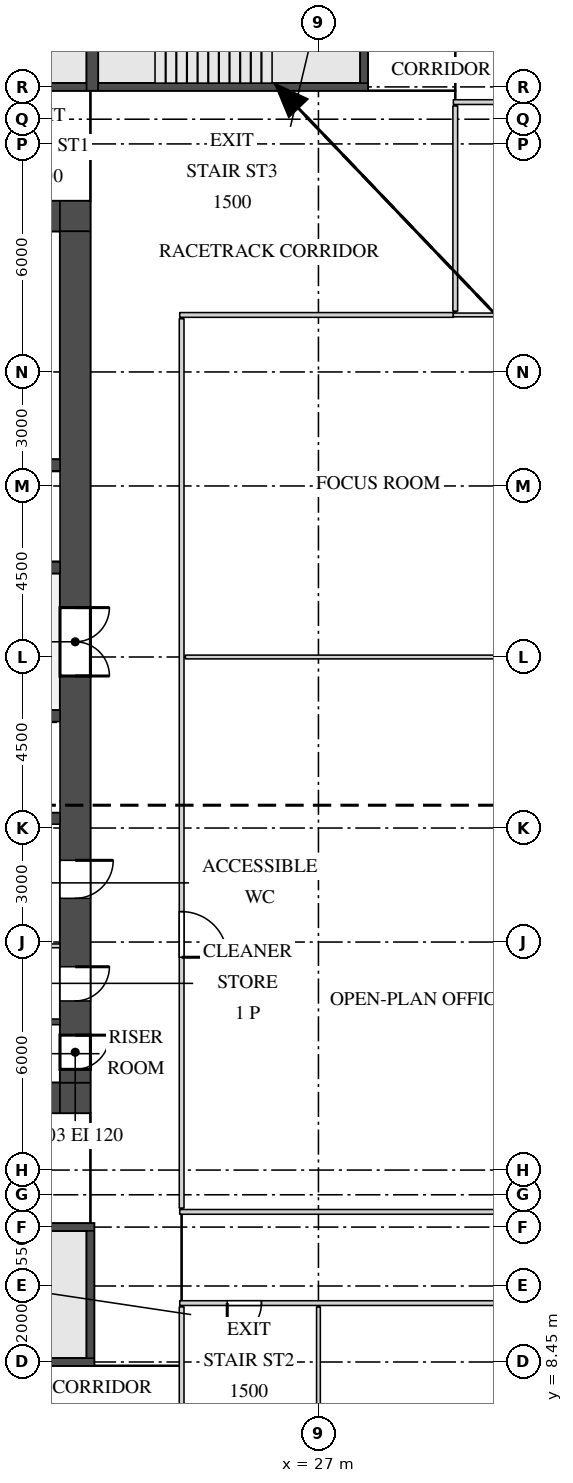
"""IFC4 building model, lengths in metres.
Left out: names, types, materials, properties, quantities, classifications, styles, units other than length and angle.
Written with IfcOpenShell. Run it as: python <this file> out.ifc"""

import sys

from ifc_helpers import new_model, si_unit, direction, frame, frame_2d, origin, place, context, subcontext, project, spatial, rectangle, extrude, source, transform, mapped, element, fill, save


model = new_model("IFC4")
c1 = context("Model", 3, precision=1e-05, world=origin(), true_north=direction((0.0, 1.0)))
c2 = subcontext(c1, "Body", "Model", "MODEL_VIEW")
j1 = project(units=[si_unit("LENGTHUNIT", "METRE"), si_unit("PLANEANGLEUNIT", "RADIAN")], contexts=[c1])
p1 = place(None, origin())
s1 = spatial("IfcSite", under=j1, at=p1, CompositionType="ELEMENT")
p2 = place(p1, origin())
s2 = spatial("IfcBuilding", under=s1, at=p2, CompositionType="ELEMENT")
p3 = place(p2, frame((0.0, 0.0, 188.7)))
s3 = spatial("IfcBuildingStorey", under=s2, at=p3, CompositionType="ELEMENT", Elevation=188.7)
m1 = source(origin(), c2, "Body", "SweptSolid", [
    extrude(rectangle(XDim=13.4, YDim=0.8, at=frame_2d((6.7, 0.0))), origin(), (0.0, 0.0, 1.0), 3.75),
])
p4 = place(p3, frame((6.8, 38.6, 0.0), z_axis=(0.0, 0.0, 1.0), x_axis=(1.0, 0.0, 0.0)))
e1 = element("IfcWall", 1, at=p4, inside=s3, PredefinedType="SHEAR", context=c2, shape_type="MappedRepresentation", body=[
    mapped(m1, transform((0.0, 0.0, 0.0))),
])
m2 = source(origin(), c2, "Body", "SweptSolid", [
    extrude(rectangle(XDim=0.9, YDim=2.1, at=frame_2d((0.45, 1.05))), frame((0.0, 0.41, 0.0), z_axis=(0.0, -1.0, 0.0), x_axis=(1.0, 0.0, 0.0)), (0.0, 0.0, 1.0), 0.82),
])
p5 = place(p4, frame((1.75, 0.0, 0.0)))
e2 = element("IfcOpeningElement", 2, at=p5, cuts=e1, PredefinedType="OPENING", context=c2, shape_type="MappedRepresentation", body=[
    mapped(m2, transform((0.0, 0.0, 0.0))),
])
p6 = place(p4, frame((8.45, 0.0, 0.0)))
e3 = element("IfcOpeningElement", 3, at=p6, cuts=e1, PredefinedType="OPENING", context=c2, shape_type="MappedRepresentation", body=[
    mapped(m2, transform((0.0, 0.0, 0.0))),
])
m3 = source(origin(), c2, "Body", "SweptSolid", [
    extrude(rectangle(XDim=0.8, YDim=0.8, at=frame_2d((0.4, 0.0))), origin(), (0.0, 0.0, 1.0), 3.75),
])
p7 = place(p3, frame((20.2, 38.6, 0.0), z_axis=(0.0, 0.0, 1.0), x_axis=(1.0, 0.0, 0.0)))
e4 = element("IfcWall", 4, at=p7, inside=s3, PredefinedType="SHEAR", context=c2, shape_type="MappedRepresentation", body=[
    mapped(m3, transform((0.0, 0.0, 0.0))),
])
p8 = place(p3, frame((6.8, 15.4, 0.0), z_axis=(0.0, 0.0, 1.0), x_axis=(1.0, 0.0, 0.0)))
e5 = element("IfcWall", 5, at=p8, inside=s3, PredefinedType="SHEAR", context=c2, shape_type="MappedRepresentation", body=[
    mapped(m1, transform((0.0, 0.0, 0.0))),
])
m4 = source(origin(), c2, "Body", "SweptSolid", [
    extrude(rectangle(XDim=1.2, YDim=2.1, at=frame_2d((0.6, 1.05))), frame((0.0, 0.41, 0.0), z_axis=(0.0, -1.0, 0.0), x_axis=(1.0, 0.0, 0.0)), (0.0, 0.0, 1.0), 0.82),
])
p9 = place(p8, frame((5.4, 0.0, 0.0)))
e6 = element("IfcOpeningElement", 6, at=p9, cuts=e5, PredefinedType="OPENING", context=c2, shape_type="MappedRepresentation", body=[
    mapped(m4, transform((0.0, 0.0, 0.0))),
])
p10 = place(p8, frame((2.05, 0.0, 0.0)))
e7 = element("IfcOpeningElement", 7, at=p10, cuts=e5, PredefinedType="OPENING", context=c2, shape_type="MappedRepresentation", body=[
    mapped(m4, transform((0.0, 0.0, 0.0))),
])
m5 = source(origin(), c2, "Body", "SweptSolid", [
    extrude(rectangle(XDim=1.0, YDim=2.1, at=frame_2d((0.5, 1.05))), frame((0.0, 0.41, 0.0), z_axis=(0.0, -1.0, 0.0), x_axis=(1.0, 0.0, 0.0)), (0.0, 0.0, 1.0), 0.82),
])
p11 = place(p8, frame((7.9, 0.0, 0.0)))
e8 = element("IfcOpeningElement", 8, at=p11, cuts=e5, PredefinedType="OPENING", context=c2, shape_type="MappedRepresentation", body=[
    mapped(m5, transform((0.0, 0.0, 0.0))),
])
p12 = place(p3, frame((20.2, 15.4, 0.0), z_axis=(0.0, 0.0, 1.0), x_axis=(1.0, 0.0, 0.0)))
e9 = element("IfcWall", 9, at=p12, inside=s3, PredefinedType="SHEAR", context=c2, shape_type="MappedRepresentation", body=[
    mapped(m3, transform((0.0, 0.0, 0.0))),
])
m6 = source(origin(), c2, "Body", "SweptSolid", [
    extrude(rectangle(XDim=22.4, YDim=0.8, at=frame_2d((11.2, 0.0))), origin(), (0.0, 0.0, 1.0), 3.75),
])
p13 = place(p3, frame((20.6, 15.8, 0.0), z_axis=(0.0, 0.0, 1.0), x_axis=(0.0, 1.0, 0.0)))
e10 = element("IfcWall", 10, at=p13, inside=s3, PredefinedType="SHEAR", context=c2, shape_type="MappedRepresentation", body=[
    mapped(m6, transform((0.0, 0.0, 0.0))),
])
m7 = source(origin(), c2, "Body", "SweptSolid", [
    extrude(rectangle(XDim=1.8, YDim=2.1, at=frame_2d((0.9, 1.05))), frame((0.0, 0.41, 0.0), z_axis=(0.0, -1.0, 0.0), x_axis=(1.0, 0.0, 0.0)), (0.0, 0.0, 1.0), 0.82),
])
p14 = place(p13, frame((10.7, 0.0, 0.0)))
e11 = element("IfcOpeningElement", 11, at=p14, cuts=e10, PredefinedType="OPENING", context=c2, shape_type="MappedRepresentation", body=[
    mapped(m7, transform((0.0, 0.0, 0.0))),
])
p15 = place(p13, frame((0.35, 0.0, 0.0)))
e12 = element("IfcOpeningElement", 12, at=p15, cuts=e10, PredefinedType="OPENING", context=c2, shape_type="MappedRepresentation", body=[
    mapped(m2, transform((0.0, 0.0, 0.0))),
])
p16 = place(p13, frame((2.15, 0.0, 0.0)))
e13 = element("IfcOpeningElement", 13, at=p16, cuts=e10, PredefinedType="OPENING", context=c2, shape_type="MappedRepresentation", body=[
    mapped(m2, transform((0.0, 0.0, 0.0))),
])
p17 = place(p13, frame((4.85, 0.0, 0.0)))
e14 = element("IfcOpeningElement", 14, at=p17, cuts=e10, PredefinedType="OPENING", context=c2, shape_type="MappedRepresentation", body=[
    mapped(m5, transform((0.0, 0.0, 0.0))),
])
m8 = source(origin(), c2, "Body", "SweptSolid", [
    extrude(rectangle(XDim=7.0, YDim=0.2, at=frame_2d((3.5, 0.0))), origin(), (0.0, 0.0, 1.0), 3.75),
])
p18 = place(p3, frame((13.9, 42.0, 0.0), z_axis=(0.0, 0.0, 1.0), x_axis=(1.0, 0.0, 0.0)))
e15 = element("IfcWall", 15, at=p18, inside=s3, PredefinedType="SHEAR", context=c2, shape_type="MappedRepresentation", body=[
    mapped(m8, transform((0.0, 0.0, 0.0))),
])
m9 = source(origin(), c2, "Body", "SweptSolid", [
    extrude(rectangle(XDim=7.2, YDim=0.2, at=frame_2d((3.6, 0.0))), origin(), (0.0, 0.0, 1.0), 3.75),
])
p19 = place(p3, frame((13.9, 12.0, 0.0), z_axis=(0.0, 0.0, 1.0), x_axis=(1.0, 0.0, 0.0)))
e16 = element("IfcWall", 16, at=p19, inside=s3, PredefinedType="SHEAR", context=c2, shape_type="MappedRepresentation", body=[
    mapped(m9, transform((0.0, 0.0, 0.0))),
])
p20 = place(p3, frame((13.9, 8.45, 0.0), z_axis=(0.0, 0.0, 1.0), x_axis=(1.0, 0.0, 0.0)))
e17 = element("IfcWall", 17, at=p20, inside=s3, PredefinedType="SHEAR", context=c2, shape_type="MappedRepresentation", body=[
    mapped(m9, transform((0.0, 0.0, 0.0))),
])
m10 = source(origin(), c2, "Body", "SweptSolid", [
    extrude(rectangle(XDim=1.2, YDim=2.1, at=frame_2d((0.6, 1.05))), frame((0.0, 0.11, 0.0), z_axis=(0.0, -1.0, 0.0), x_axis=(1.0, 0.0, 0.0)), (0.0, 0.0, 1.0), 0.22),
])
p21 = place(p20, frame((0.35, 0.0, 0.0)))
e18 = element("IfcOpeningElement", 18, at=p21, cuts=e17, PredefinedType="OPENING", context=c2, shape_type="MappedRepresentation", body=[
    mapped(m10, transform((0.0, 0.0, 0.0))),
])
m11 = source(origin(), c2, "Body", "SweptSolid", [
    extrude(rectangle(XDim=7.1, YDim=0.2, at=frame_2d((3.55, 0.0))), origin(), (0.0, 0.0, 1.0), 3.75),
])
p22 = place(p3, frame((21.2, 42.0, 0.0), z_axis=(0.0, 0.0, 1.0), x_axis=(1.0, 0.0, 0.0)))
e19 = element("IfcWall", 19, at=p22, inside=s3, PredefinedType="SHEAR", context=c2, shape_type="MappedRepresentation", body=[
    mapped(m11, transform((0.0, 0.0, 0.0))),
])
m12 = source(origin(), c2, "Body", "SweptSolid", [
    extrude(rectangle(XDim=3.75, YDim=0.3, at=frame_2d((1.875, 0.0))), origin(), (0.0, 0.0, 1.0), 3.75),
])
p23 = place(p3, frame((21.05, 41.9, 0.0), z_axis=(0.0, 0.0, 1.0), x_axis=(0.0, 1.0, 0.0)))
e20 = element("IfcWall", 20, at=p23, inside=s3, PredefinedType="SHEAR", context=c2, shape_type="MappedRepresentation", body=[
    mapped(m12, transform((0.0, 0.0, 0.0))),
])
m13 = source(origin(), c2, "Body", "SweptSolid", [
    extrude(rectangle(XDim=3.35, YDim=0.2, at=frame_2d((1.675, 0.0))), origin(), (0.0, 0.0, 1.0), 3.75),
])
for number, where, z_axis, x_axis in (
    (21, (21.0, 8.55, 0.0), (0.0, 0.0, 1.0), (0.0, 1.0, 0.0)),
    (22, (28.2, 42.1, 0.0), (0.0, 0.0, 1.0), (0.0, 1.0, 0.0)),
):
    element("IfcWall", number, at=place(p3, frame(where, z_axis=z_axis, x_axis=x_axis)), inside=s3, PredefinedType="SHEAR", context=c2, shape_type="MappedRepresentation", body=[
        mapped(m13, transform((0.0, 0.0, 0.0))),
    ])
m14 = source(origin(), c2, "Body", "SweptSolid", [
    extrude(rectangle(XDim=13.4, YDim=0.3, at=frame_2d((6.7, 0.0))), origin(), (0.0, 0.0, 1.0), 3.75),
])
for number, where, z_axis, x_axis in (
    (23, (6.8, 22.75, 0.0), (0.0, 0.0, 1.0), (1.0, 0.0, 0.0)),
    (24, (6.8, 32.05, 0.0), (0.0, 0.0, 1.0), (1.0, 0.0, 0.0)),
):
    element("IfcWall", number, at=place(p3, frame(where, z_axis=z_axis, x_axis=x_axis)), inside=s3, PredefinedType="STANDARD", context=c2, shape_type="MappedRepresentation", body=[
        mapped(m14, transform((0.0, 0.0, 0.0))),
    ])
p24 = place(p3, frame((6.8, 29.35, 0.0), z_axis=(0.0, 0.0, 1.0), x_axis=(1.0, 0.0, 0.0)))
e25 = element("IfcWall", 25, at=p24, inside=s3, PredefinedType="STANDARD", context=c2, shape_type="MappedRepresentation", body=[
    mapped(m14, transform((0.0, 0.0, 0.0))),
])
m15 = source(origin(), c2, "Body", "SweptSolid", [
    extrude(rectangle(XDim=1.2, YDim=2.1, at=frame_2d((0.6, 1.05))), frame((0.0, 0.16, 0.0), z_axis=(0.0, -1.0, 0.0), x_axis=(1.0, 0.0, 0.0)), (0.0, 0.0, 1.0), 0.32),
])
p25 = place(p24, frame((0.95, 0.0, 0.0)))
e26 = element("IfcOpeningElement", 26, at=p25, cuts=e25, PredefinedType="OPENING", context=c2, shape_type="MappedRepresentation", body=[
    mapped(m15, transform((0.0, 0.0, 0.0))),
])
p26 = place(p24, frame((3.5, 0.0, 0.0)))
e27 = element("IfcOpeningElement", 27, at=p26, cuts=e25, PredefinedType="OPENING", context=c2, shape_type="MappedRepresentation", body=[
    mapped(m15, transform((0.0, 0.0, 0.0))),
])
p27 = place(p24, frame((6.05, 0.0, 0.0)))
e28 = element("IfcOpeningElement", 28, at=p27, cuts=e25, PredefinedType="OPENING", context=c2, shape_type="MappedRepresentation", body=[
    mapped(m15, transform((0.0, 0.0, 0.0))),
])
p28 = place(p24, frame((8.6, 0.0, 0.0)))
e29 = element("IfcOpeningElement", 29, at=p28, cuts=e25, PredefinedType="OPENING", context=c2, shape_type="MappedRepresentation", body=[
    mapped(m15, transform((0.0, 0.0, 0.0))),
])
p29 = place(p24, frame((11.15, 0.0, 0.0)))
e30 = element("IfcOpeningElement", 30, at=p29, cuts=e25, PredefinedType="OPENING", context=c2, shape_type="MappedRepresentation", body=[
    mapped(m15, transform((0.0, 0.0, 0.0))),
])
p30 = place(p3, frame((6.8, 25.45, 0.0), z_axis=(0.0, 0.0, 1.0), x_axis=(1.0, 0.0, 0.0)))
e31 = element("IfcWall", 31, at=p30, inside=s3, PredefinedType="STANDARD", context=c2, shape_type="MappedRepresentation", body=[
    mapped(m14, transform((0.0, 0.0, 0.0))),
])
p31 = place(p30, frame((0.95, 0.0, 0.0)))
e32 = element("IfcOpeningElement", 32, at=p31, cuts=e31, PredefinedType="OPENING", context=c2, shape_type="MappedRepresentation", body=[
    mapped(m15, transform((0.0, 0.0, 0.0))),
])
p32 = place(p30, frame((3.5, 0.0, 0.0)))
e33 = element("IfcOpeningElement", 33, at=p32, cuts=e31, PredefinedType="OPENING", context=c2, shape_type="MappedRepresentation", body=[
    mapped(m15, transform((0.0, 0.0, 0.0))),
])
p33 = place(p30, frame((6.05, 0.0, 0.0)))
e34 = element("IfcOpeningElement", 34, at=p33, cuts=e31, PredefinedType="OPENING", context=c2, shape_type="MappedRepresentation", body=[
    mapped(m15, transform((0.0, 0.0, 0.0))),
])
p34 = place(p30, frame((8.6, 0.0, 0.0)))
e35 = element("IfcOpeningElement", 35, at=p34, cuts=e31, PredefinedType="OPENING", context=c2, shape_type="MappedRepresentation", body=[
    mapped(m15, transform((0.0, 0.0, 0.0))),
])
p35 = place(p30, frame((11.15, 0.0, 0.0)))
e36 = element("IfcOpeningElement", 36, at=p35, cuts=e31, PredefinedType="OPENING", context=c2, shape_type="MappedRepresentation", body=[
    mapped(m15, transform((0.0, 0.0, 0.0))),
])
m16 = source(origin(), c2, "Body", "SweptSolid", [
    extrude(rectangle(XDim=6.75, YDim=0.1, at=frame_2d((3.375, 0.0))), origin(), (0.0, 0.0, 1.0), 3.3),
])
p36 = place(p3, frame((27.0, 3.15, 0.0), z_axis=(0.0, 0.0, 1.0), x_axis=(0.0, 1.0, 0.0)))
e37 = element("IfcWall", 37, at=p36, inside=s3, PredefinedType="PARTITIONING", context=c2, shape_type="MappedRepresentation", body=[
    mapped(m16, transform((0.0, 0.0, 0.0))),
])
m17 = source(origin(), c2, "Body", "SweptSolid", [
    extrude(rectangle(XDim=3.75, YDim=0.125, at=frame_2d((1.875, 0.0))), origin(), (0.0, 0.0, 1.0), 3.8),
])
p37 = place(p3, frame((23.4, 6.15, 0.0), z_axis=(0.0, 0.0, 1.0), x_axis=(0.0, 1.0, 0.0)))
e38 = element("IfcWall", 38, at=p37, inside=s3, PredefinedType="PARTITIONING", context=c2, shape_type="MappedRepresentation", body=[
    mapped(m17, transform((0.0, 0.0, 0.0))),
])
m18 = source(origin(), c2, "Body", "SweptSolid", [
    extrude(rectangle(XDim=20.6, YDim=0.125, at=frame_2d((10.3, 0.0))), origin(), (0.0, 0.0, 1.0), 3.8),
])
p38 = place(p3, frame((23.35, 10.0, 0.0), z_axis=(0.0, 0.0, 1.0), x_axis=(1.0, 0.0, 0.0)))
e39 = element("IfcWall", 39, at=p38, inside=s3, PredefinedType="PARTITIONING", context=c2, shape_type="MappedRepresentation", body=[
    mapped(m18, transform((0.0, 0.0, 0.0))),
])
m19 = source(origin(), c2, "Body", "SweptSolid", [
    extrude(rectangle(XDim=0.9, YDim=2.1, at=frame_2d((0.45, 1.05))), frame((0.0, 0.073, 0.0), z_axis=(0.0, -1.0, 0.0), x_axis=(1.0, 0.0, 0.0)), (0.0, 0.0, 1.0), 0.145),
])
p39 = place(p38, frame((1.25, 0.0, 0.0)))
e40 = element("IfcOpeningElement", 40, at=p39, cuts=e39, PredefinedType="OPENING", context=c2, shape_type="MappedRepresentation", body=[
    mapped(m19, transform((0.0, 0.0, 0.0))),
])
m20 = source(origin(), c2, "Body", "SweptSolid", [
    extrude(rectangle(XDim=1.2, YDim=2.1, at=frame_2d((0.6, 1.05))), frame((0.0, 0.073, 0.0), z_axis=(0.0, -1.0, 0.0), x_axis=(1.0, 0.0, 0.0)), (0.0, 0.0, 1.0), 0.145),
])
p40 = place(p38, frame((10.55, 0.0, 0.0)))
e41 = element("IfcOpeningElement", 41, at=p40, cuts=e39, PredefinedType="OPENING", context=c2, shape_type="MappedRepresentation", body=[
    mapped(m20, transform((0.0, 0.0, 0.0))),
])
p41 = place(p38, frame((19.05, 0.0, 0.0)))
e42 = element("IfcOpeningElement", 42, at=p41, cuts=e39, PredefinedType="OPENING", context=c2, shape_type="MappedRepresentation", body=[
    mapped(m20, transform((0.0, 0.0, 0.0))),
])
m21 = source(origin(), c2, "Body", "SweptSolid", [
    extrude(rectangle(XDim=18.3, YDim=0.125, at=frame_2d((9.15, 0.0))), origin(), (0.0, 0.0, 1.0), 3.8),
])
p42 = place(p3, frame((23.35, 12.4, 0.0), z_axis=(0.0, 0.0, 1.0), x_axis=(1.0, 0.0, 0.0)))
e43 = element("IfcWall", 43, at=p42, inside=s3, PredefinedType="PARTITIONING", context=c2, shape_type="MappedRepresentation", body=[
    mapped(m21, transform((0.0, 0.0, 0.0))),
])
m22 = source(origin(), c2, "Body", "SweptSolid", [
    extrude(rectangle(XDim=23.4, YDim=0.125, at=frame_2d((11.7, 0.0))), origin(), (0.0, 0.0, 1.0), 3.8),
])
p43 = place(p3, frame((23.4, 12.5, 0.0), z_axis=(0.0, 0.0, 1.0), x_axis=(0.0, 1.0, 0.0)))
e44 = element("IfcWall", 44, at=p43, inside=s3, PredefinedType="PARTITIONING", context=c2, shape_type="MappedRepresentation", body=[
    mapped(m22, transform((0.0, 0.0, 0.0))),
])
p44 = place(p43, frame((6.6, 0.0, 0.0)))
e45 = element("IfcOpeningElement", 45, at=p44, cuts=e44, PredefinedType="OPENING", context=c2, shape_type="MappedRepresentation", body=[
    mapped(m20, transform((0.0, 0.0, 0.0))),
])
m23 = source(origin(), c2, "Body", "SweptSolid", [
    extrude(rectangle(XDim=4.0, YDim=0.15, at=frame_2d((2.0, 0.0))), origin(), (0.0, 0.0, 1.0), 3.8),
])
p45 = place(p3, frame((16.2, 17.4, 0.0), z_axis=(0.0, 0.0, 1.0), x_axis=(1.0, 0.0, 0.0)))
e46 = element("IfcWall", 46, at=p45, inside=s3, PredefinedType="PARTITIONING", context=c2, shape_type="MappedRepresentation", body=[
    mapped(m23, transform((0.0, 0.0, 0.0))),
])
m24 = source(origin(), c2, "Body", "SweptSolid", [
    extrude(rectangle(XDim=4.1, YDim=0.1, at=frame_2d((2.05, 0.0))), origin(), (0.0, 0.0, 1.0), 3.8),
])
p46 = place(p3, frame((16.1, 19.4, 0.0), z_axis=(0.0, 0.0, 1.0), x_axis=(1.0, 0.0, 0.0)))
e47 = element("IfcWall", 47, at=p46, inside=s3, PredefinedType="PARTITIONING", context=c2, shape_type="MappedRepresentation", body=[
    mapped(m24, transform((0.0, 0.0, 0.0))),
])
m25 = source(origin(), c2, "Body", "SweptSolid", [
    extrude(rectangle(XDim=18.0, YDim=0.1, at=frame_2d((9.0, 0.0))), origin(), (0.0, 0.0, 1.0), 3.8),
])
p47 = place(p3, frame((23.5, 27.0, 0.0), z_axis=(0.0, 0.0, 1.0), x_axis=(1.0, 0.0, 0.0)))
e48 = element("IfcWall", 48, at=p47, inside=s3, PredefinedType="PARTITIONING", context=c2, shape_type="MappedRepresentation", body=[
    mapped(m25, transform((0.0, 0.0, 0.0))),
])
m26 = source(origin(), c2, "Body", "SweptSolid", [
    extrude(rectangle(XDim=7.2, YDim=0.125, at=frame_2d((3.6, 0.0))), origin(), (0.0, 0.0, 1.0), 3.8),
])
p48 = place(p3, frame((23.35, 36.0, 0.0), z_axis=(0.0, 0.0, 1.0), x_axis=(1.0, 0.0, 0.0)))
e49 = element("IfcWall", 49, at=p48, inside=s3, PredefinedType="PARTITIONING", context=c2, shape_type="MappedRepresentation", body=[
    mapped(m26, transform((0.0, 0.0, 0.0))),
])
m27 = source(origin(), c2, "Body", "SweptSolid", [
    extrude(rectangle(XDim=10.95, YDim=0.1, at=frame_2d((5.475, 0.0))), origin(), (0.0, 0.0, 1.0), 3.8),
])
p49 = place(p3, frame((30.55, 36.0, 0.0), z_axis=(0.0, 0.0, 1.0), x_axis=(1.0, 0.0, 0.0)))
e50 = element("IfcWall", 50, at=p49, inside=s3, PredefinedType="PARTITIONING", context=c2, shape_type="MappedRepresentation", body=[
    mapped(m27, transform((0.0, 0.0, 0.0))),
])
m28 = source(origin(), c2, "Body", "SweptSolid", [
    extrude(rectangle(XDim=5.4, YDim=0.125, at=frame_2d((2.7, 0.0))), origin(), (0.0, 0.0, 1.0), 3.8),
])
p50 = place(p3, frame((30.6, 36.1, 0.0), z_axis=(0.0, 0.0, 1.0), x_axis=(0.0, 1.0, 0.0)))
e51 = element("IfcWall", 51, at=p50, inside=s3, PredefinedType="PARTITIONING", context=c2, shape_type="MappedRepresentation", body=[
    mapped(m28, transform((0.0, 0.0, 0.0))),
])
m29 = source(origin(), c2, "Body", "SweptSolid", [
    extrude(rectangle(XDim=11.1, YDim=0.125, at=frame_2d((5.55, 0.0))), origin(), (0.0, 0.0, 1.0), 3.8),
])
p51 = place(p3, frame((30.55, 41.6, 0.0), z_axis=(0.0, 0.0, 1.0), x_axis=(1.0, 0.0, 0.0)))
e52 = element("IfcWall", 52, at=p51, inside=s3, PredefinedType="PARTITIONING", context=c2, shape_type="MappedRepresentation", body=[
    mapped(m29, transform((0.0, 0.0, 0.0))),
])
p52 = place(p51, frame((5.25, 0.0, 0.0)))
e53 = element("IfcOpeningElement", 53, at=p52, cuts=e52, PredefinedType="OPENING", context=c2, shape_type="MappedRepresentation", body=[
    mapped(m19, transform((0.0, 0.0, 0.0))),
])
m30 = source(origin(), c2, "Body", "SweptSolid", [
    extrude(rectangle(XDim=1.8, YDim=2.1, at=frame_2d((0.9, 1.05))), frame((0.0, 0.35, 0.0), z_axis=(0.0, -1.0, 0.0), x_axis=(1.0, 0.0, 0.0)), (0.0, 0.0, 1.0), 0.7),
])
p53 = place(p14, origin())
e54 = element("IfcDoor", 54, at=p53, inside=s3, OperationType="DOUBLE_DOOR_SINGLE_SWING", PredefinedType="DOOR", context=c2, shape_type="MappedRepresentation", body=[
    mapped(m30, transform((0.0, 0.0, 0.0))),
])
fill(e11, e54)
m31 = source(origin(), c2, "Body", "SweptSolid", [
    extrude(rectangle(XDim=0.9, YDim=2.1, at=frame_2d((0.45, 1.05))), frame((0.0, 0.35, 0.0), z_axis=(0.0, -1.0, 0.0), x_axis=(1.0, 0.0, 0.0)), (0.0, 0.0, 1.0), 0.7),
])
p54 = place(p15, origin())
e55 = element("IfcDoor", 55, at=p54, inside=s3, OperationType="SINGLE_SWING_RIGHT", PredefinedType="DOOR", context=c2, shape_type="MappedRepresentation", body=[
    mapped(m31, transform((0.0, 0.0, 0.0))),
])
fill(e12, e55)
p55 = place(p16, origin())
e56 = element("IfcDoor", 56, at=p55, inside=s3, OperationType="SINGLE_SWING_RIGHT", PredefinedType="DOOR", context=c2, shape_type="MappedRepresentation", body=[
    mapped(m31, transform((0.0, 0.0, 0.0))),
])
fill(e13, e56)
m32 = source(origin(), c2, "Body", "SweptSolid", [
    extrude(rectangle(XDim=1.0, YDim=2.1, at=frame_2d((0.5, 1.05))), frame((0.0, 0.35, 0.0), z_axis=(0.0, -1.0, 0.0), x_axis=(1.0, 0.0, 0.0)), (0.0, 0.0, 1.0), 0.7),
])
p56 = place(p17, origin())
e57 = element("IfcDoor", 57, at=p56, inside=s3, OperationType="SINGLE_SWING_RIGHT", PredefinedType="DOOR", context=c2, shape_type="MappedRepresentation", body=[
    mapped(m32, transform((0.0, 0.0, 0.0))),
])
fill(e14, e57)
m33 = source(origin(), c2, "Body", "SweptSolid", [
    extrude(rectangle(XDim=0.9, YDim=2.1, at=frame_2d((0.45, 1.05))), frame((0.0, 0.025, 0.0), z_axis=(0.0, -1.0, 0.0), x_axis=(1.0, 0.0, 0.0)), (0.0, 0.0, 1.0), 0.05),
])
p57 = place(p39, origin())
e58 = element("IfcDoor", 58, at=p57, inside=s3, OperationType="SINGLE_SWING_LEFT", PredefinedType="DOOR", context=c2, shape_type="MappedRepresentation", body=[
    mapped(m33, transform((0.0, 0.0, 0.0))),
])
fill(e40, e58)
m34 = source(origin(), c2, "Body", "SweptSolid", [
    extrude(rectangle(XDim=1.2, YDim=2.1, at=frame_2d((0.6, 1.05))), frame((0.0, 0.025, 0.0), z_axis=(0.0, -1.0, 0.0), x_axis=(1.0, 0.0, 0.0)), (0.0, 0.0, 1.0), 0.05),
])
p58 = place(p44, origin())
e59 = element("IfcDoor", 59, at=p58, inside=s3, OperationType="SINGLE_SWING_LEFT", PredefinedType="DOOR", context=c2, shape_type="MappedRepresentation", body=[
    mapped(m34, transform((0.0, 0.0, 0.0))),
])
fill(e45, e59)
save(model, sys.argv[1])
